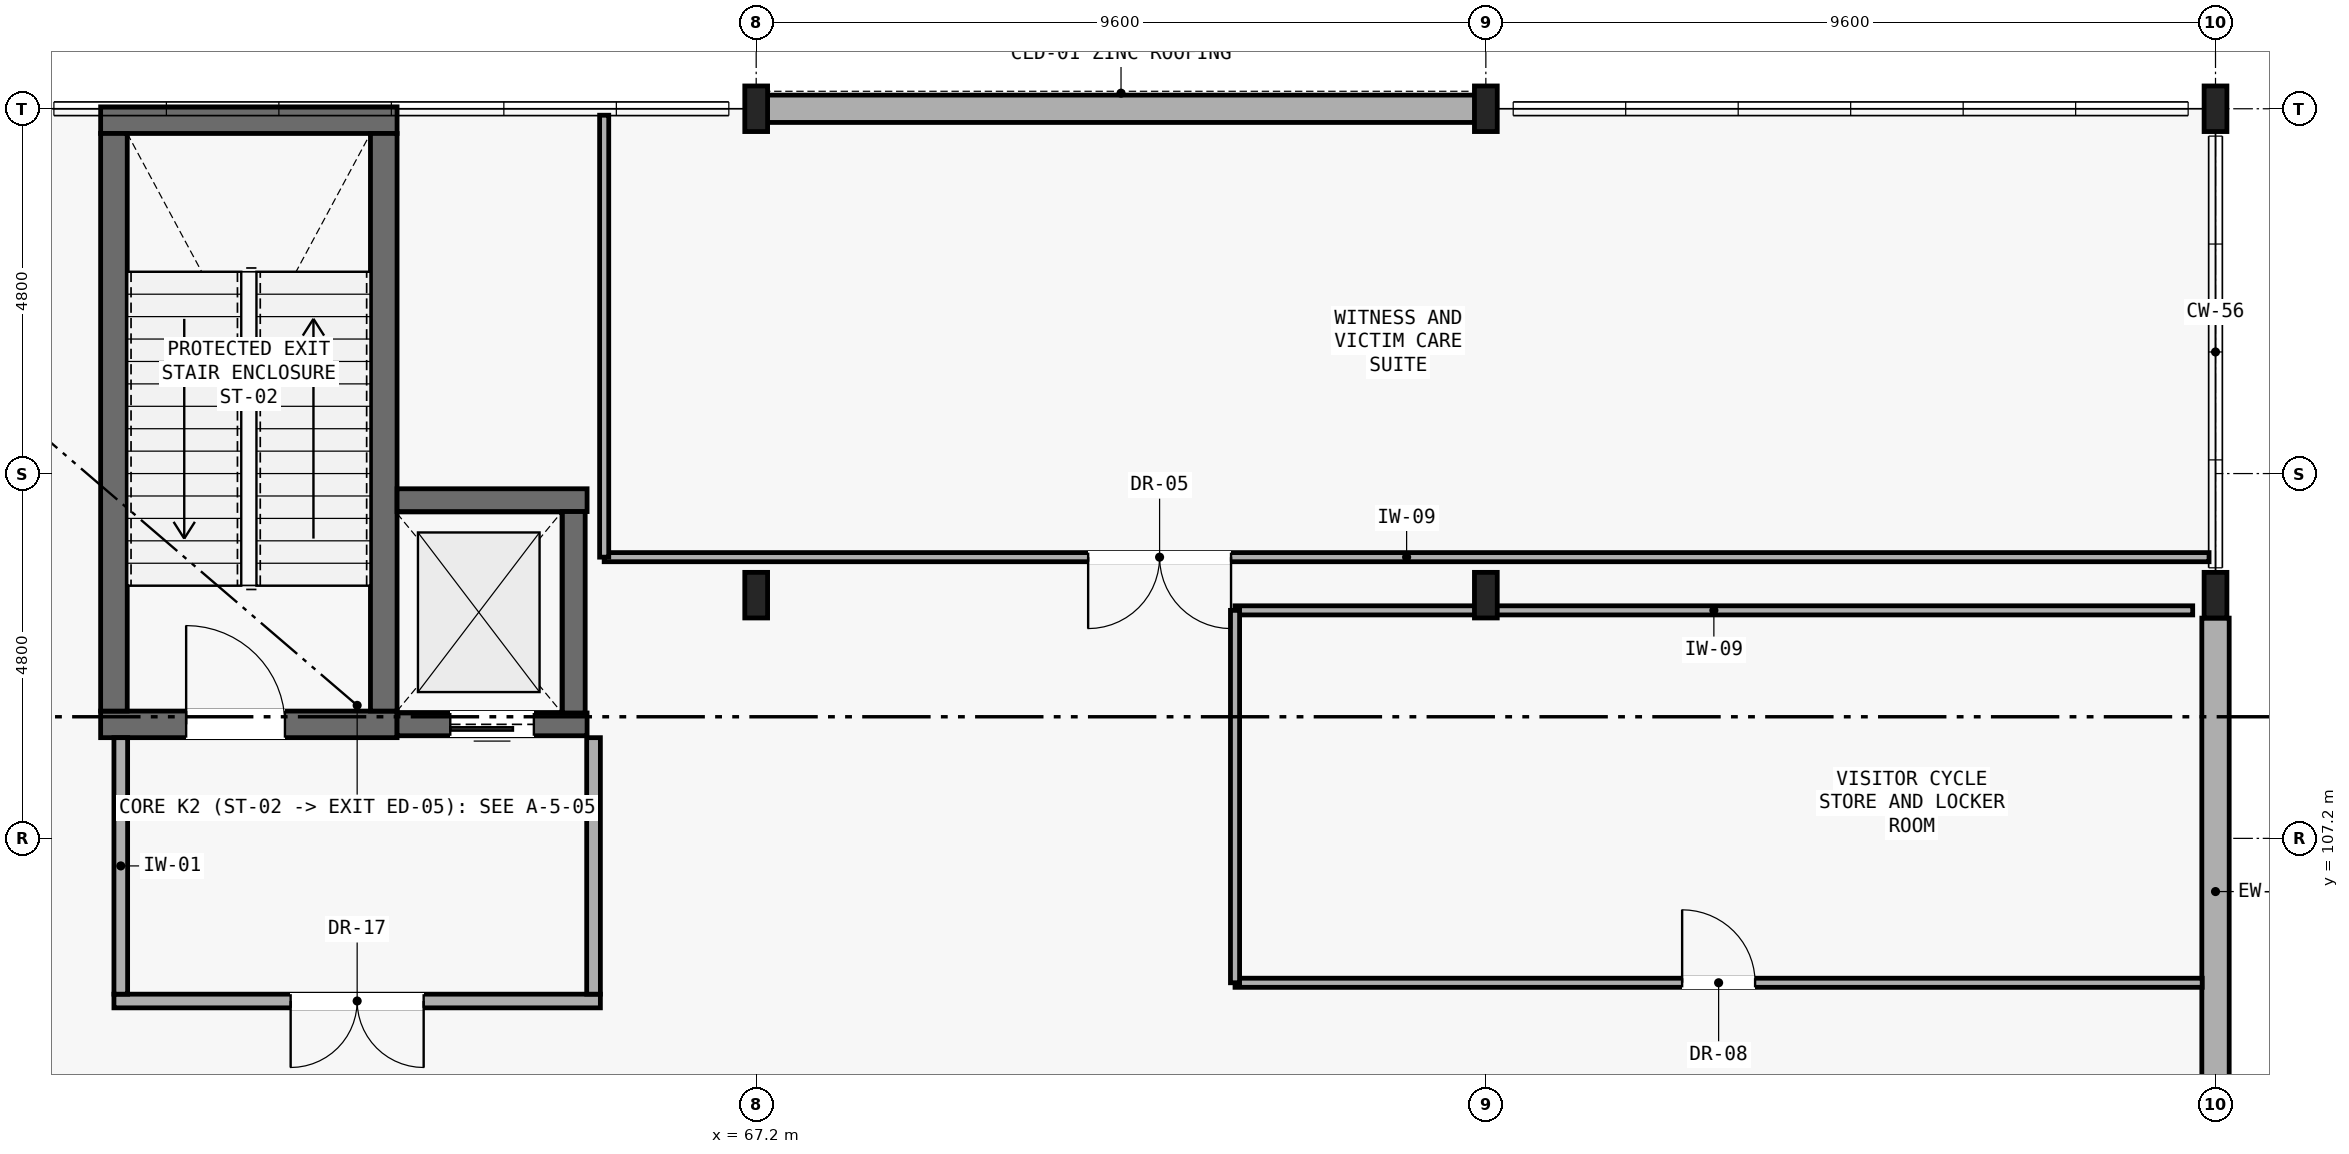
"""IFC4 building model, lengths in metres.
Left out: names, types, materials, properties, quantities, classifications, styles, units other than length and angle.
Written with IfcOpenShell. Run it as: python <this file> out.ifc"""

import sys

from ifc_helpers import new_model, si_unit, direction, frame, frame_2d, origin, origin_2d, place, context, subcontext, project, spatial, rectangle, i_section, extrude, element, fill, save


model = new_model("IFC4")
c1 = context("Model", 3, precision=1e-05, world=origin(), true_north=direction((0.0, 1.0)))
c2 = subcontext(c1, "Body", "Model", "MODEL_VIEW")
j1 = project(units=[si_unit("LENGTHUNIT", "METRE"), si_unit("PLANEANGLEUNIT", "RADIAN")], contexts=[c1])
p1 = place(None, origin())
s1 = spatial("IfcSite", under=j1, at=p1, CompositionType="ELEMENT")
p2 = place(p1, origin())
s2 = spatial("IfcBuilding", under=s1, at=p2, CompositionType="ELEMENT")
p3 = place(p2, origin())
s3 = spatial("IfcBuildingStorey", under=s2, at=p3, CompositionType="ELEMENT", Elevation=0.0)
for number, where, z_axis, x_axis in (
    (1, (67.2, 110.4, 0.0), (0.0, 0.0, 1.0), (1.0, 0.0, 0.0)),
    (2, (67.2, 116.8, 0.0), (0.0, 0.0, 1.0), (1.0, 0.0, 0.0)),
    (3, (76.8, 110.4, 0.0), (0.0, 0.0, 1.0), (1.0, 0.0, 0.0)),
    (4, (76.8, 116.8, 0.0), (0.0, 0.0, 1.0), (1.0, 0.0, 0.0)),
    (5, (86.4, 110.4, 0.0), (0.0, 0.0, 1.0), (1.0, 0.0, 0.0)),
    (6, (86.4, 116.8, 0.0), (0.0, 0.0, 1.0), (1.0, 0.0, 0.0)),
):
    element("IfcColumn", number, at=place(p3, frame(where, z_axis=z_axis, x_axis=x_axis)), inside=s3, PredefinedType="COLUMN", context=c2, shape_type="SweptSolid", body=[
        extrude(i_section(OverallWidth=0.3, OverallDepth=0.6, WebThickness=0.015, FlangeThickness=0.03, FilletRadius=0.027, at=origin_2d()), origin(), (0.0, 0.0, 1.0), 5.25),
    ])
p4 = place(p3, frame((67.21, 116.8, 0.0), z_axis=(0.0, 0.0, 1.0), x_axis=(1.0, 0.0, 0.0)))
e7 = element("IfcWall", 7, at=p4, inside=s3, PredefinedType="SOLIDWALL", context=c2, shape_type="SweptSolid", body=[
    extrude(rectangle(XDim=9.581, YDim=0.36, at=frame_2d((4.79, 0.0))), origin(), (0.0, 0.0, 1.0), 4.67),
])
p5 = place(p3, frame((86.4, 102.902, 0.0), z_axis=(0.0, 0.0, 1.0), x_axis=(0.0, 1.0, 0.0)))
e8 = element("IfcWall", 8, at=p5, inside=s3, PredefinedType="SOLIDWALL", context=c2, shape_type="SweptSolid", body=[
    extrude(rectangle(XDim=7.196, YDim=0.36, at=frame_2d((3.598, 0.0))), origin(), (0.0, 0.0, 1.0), 4.54),
])
p6 = place(p3, frame((58.575, 108.7, 0.0), z_axis=(0.0, 0.0, 1.0), x_axis=(1.0, 0.0, 0.0)))
e9 = element("IfcWall", 9, at=p6, inside=s3, PredefinedType="SHEAR", context=c2, shape_type="SweptSolid", body=[
    extrude(rectangle(XDim=3.9, YDim=0.35, at=frame_2d((1.95, 0.0))), origin(), (0.0, 0.0, 1.0), 5.0),
])
p7 = place(p6, frame((1.125, 0.0, 0.0)))
e10 = element("IfcOpeningElement", 10, at=p7, cuts=e9, PredefinedType="OPENING", context=c2, shape_type="SweptSolid", body=[
    extrude(rectangle(XDim=1.3, YDim=2.15, at=frame_2d((0.65, 1.075))), frame((0.0, 0.185, 0.0), z_axis=(0.0, -1.0, 0.0), x_axis=(1.0, 0.0, 0.0)), (0.0, 0.0, 1.0), 0.37),
])
p8 = place(p3, frame((58.575, 116.65, 0.0), z_axis=(0.0, 0.0, 1.0), x_axis=(1.0, 0.0, 0.0)))
e11 = element("IfcWall", 11, at=p8, inside=s3, PredefinedType="SHEAR", context=c2, shape_type="SweptSolid", body=[
    extrude(rectangle(XDim=3.9, YDim=0.35, at=frame_2d((1.95, 0.0))), origin(), (0.0, 0.0, 1.0), 5.0),
])
for number, where, z_axis, x_axis in (
    (12, (58.75, 108.875, 0.0), (0.0, 0.0, 1.0), (0.0, 1.0, 0.0)),
    (13, (62.3, 108.875, 0.0), (0.0, 0.0, 1.0), (0.0, 1.0, 0.0)),
):
    element("IfcWall", number, at=place(p3, frame(where, z_axis=z_axis, x_axis=x_axis)), inside=s3, PredefinedType="SHEAR", context=c2, shape_type="SweptSolid", body=[
        extrude(rectangle(XDim=7.6, YDim=0.35, at=frame_2d((3.8, 0.0))), origin(), (0.0, 0.0, 1.0), 5.0),
    ])
p9 = place(p3, frame((62.475, 108.7, 0.0), z_axis=(0.0, 0.0, 1.0), x_axis=(1.0, 0.0, 0.0)))
e14 = element("IfcWall", 14, at=p9, inside=s3, PredefinedType="SHEAR", context=c2, shape_type="SweptSolid", body=[
    extrude(rectangle(XDim=2.5, YDim=0.3, at=frame_2d((1.25, 0.0))), origin(), (0.0, 0.0, 1.0), 5.0),
])
p10 = place(p9, frame((0.7, 0.0, 0.0)))
e15 = element("IfcOpeningElement", 15, at=p10, cuts=e14, PredefinedType="OPENING", context=c2, shape_type="SweptSolid", body=[
    extrude(rectangle(XDim=1.1, YDim=2.1, at=frame_2d((0.55, 1.05))), frame((0.0, 0.16, 0.0), z_axis=(0.0, -1.0, 0.0), x_axis=(1.0, 0.0, 0.0)), (0.0, 0.0, 1.0), 0.32),
])
p11 = place(p3, frame((62.475, 111.65, 0.0), z_axis=(0.0, 0.0, 1.0), x_axis=(1.0, 0.0, 0.0)))
e16 = element("IfcWall", 16, at=p11, inside=s3, PredefinedType="SHEAR", context=c2, shape_type="SweptSolid", body=[
    extrude(rectangle(XDim=2.5, YDim=0.3, at=frame_2d((1.25, 0.0))), origin(), (0.0, 0.0, 1.0), 5.0),
])
p12 = place(p3, frame((64.8, 108.85, 0.0), z_axis=(0.0, 0.0, 1.0), x_axis=(0.0, 1.0, 0.0)))
e17 = element("IfcWall", 17, at=p12, inside=s3, PredefinedType="SHEAR", context=c2, shape_type="SweptSolid", body=[
    extrude(rectangle(XDim=2.65, YDim=0.3, at=frame_2d((1.325, 0.0))), origin(), (0.0, 0.0, 1.0), 5.0),
])
p13 = place(p3, frame((58.75, 105.06, 0.0), z_axis=(0.0, 0.0, 1.0), x_axis=(1.0, 0.0, 0.0)))
e18 = element("IfcWall", 18, at=p13, inside=s3, PredefinedType="PARTITIONING", context=c2, shape_type="SweptSolid", body=[
    extrude(rectangle(XDim=6.4, YDim=0.18, at=frame_2d((3.2, 0.0))), origin(), (0.0, 0.0, 1.0), 4.62),
])
p14 = place(p13, frame((2.325, 0.0, 0.0)))
e19 = element("IfcOpeningElement", 19, at=p14, cuts=e18, PredefinedType="OPENING", context=c2, shape_type="SweptSolid", body=[
    extrude(rectangle(XDim=1.75, YDim=2.15, at=frame_2d((0.875, 1.075))), frame((0.0, 0.1, 0.0), z_axis=(0.0, -1.0, 0.0), x_axis=(1.0, 0.0, 0.0)), (0.0, 0.0, 1.0), 0.2),
])
for number, where, z_axis, x_axis in (
    (20, (58.84, 105.15, 0.0), (0.0, 0.0, 1.0), (0.0, 1.0, 0.0)),
    (21, (65.06, 105.15, 0.0), (0.0, 0.0, 1.0), (0.0, 1.0, 0.0)),
):
    element("IfcWall", number, at=place(p3, frame(where, z_axis=z_axis, x_axis=x_axis)), inside=s3, PredefinedType="PARTITIONING", context=c2, shape_type="SweptSolid", body=[
        extrude(rectangle(XDim=3.375, YDim=0.18, at=frame_2d((1.688, 0.0))), origin(), (0.0, 0.0, 1.0), 5.0),
    ])
p15 = place(p3, frame((65.2, 110.9, 0.0), z_axis=(0.0, 0.0, 1.0), x_axis=(1.0, 0.0, 0.0)))
e22 = element("IfcWall", 22, at=p15, inside=s3, PredefinedType="PARTITIONING", context=c2, shape_type="SweptSolid", body=[
    extrude(rectangle(XDim=21.115, YDim=0.12, at=frame_2d((10.558, 0.0))), origin(), (0.0, 0.0, 1.0), 5.0),
])
p16 = place(p15, frame((6.367, 0.0, 0.0)))
e23 = element("IfcOpeningElement", 23, at=p16, cuts=e22, PredefinedType="OPENING", context=c2, shape_type="SweptSolid", body=[
    extrude(rectangle(XDim=1.88, YDim=2.25, at=frame_2d((0.94, 1.125))), frame((0.0, 0.07, 0.0), z_axis=(0.0, -1.0, 0.0), x_axis=(1.0, 0.0, 0.0)), (0.0, 0.0, 1.0), 0.14),
])
p17 = place(p3, frame((65.2, 116.715, 0.0), z_axis=(0.0, 0.0, 1.0), x_axis=(0.0, -1.0, 0.0)))
e24 = element("IfcWall", 24, at=p17, inside=s3, PredefinedType="PARTITIONING", context=c2, shape_type="SweptSolid", body=[
    extrude(rectangle(XDim=5.815, YDim=0.12, at=frame_2d((2.908, 0.0))), origin(), (0.0, 0.0, 1.0), 5.0),
])
p18 = place(p3, frame((73.5, 105.3, 0.0), z_axis=(0.0, 0.0, 1.0), x_axis=(1.0, 0.0, 0.0)))
e25 = element("IfcWall", 25, at=p18, inside=s3, PredefinedType="PARTITIONING", context=c2, shape_type="SweptSolid", body=[
    extrude(rectangle(XDim=12.725, YDim=0.12, at=frame_2d((6.363, 0.0))), origin(), (0.0, 0.0, 1.0), 4.62),
])
p19 = place(p18, frame((5.883, 0.0, 0.0)))
e26 = element("IfcOpeningElement", 26, at=p19, cuts=e25, PredefinedType="OPENING", context=c2, shape_type="SweptSolid", body=[
    extrude(rectangle(XDim=0.96, YDim=2.08, at=frame_2d((0.48, 1.04))), frame((0.0, 0.07, 0.0), z_axis=(0.0, -1.0, 0.0), x_axis=(1.0, 0.0, 0.0)), (0.0, 0.0, 1.0), 0.14),
])
p20 = place(p3, frame((86.1, 110.2, 0.0), z_axis=(0.0, 0.0, 1.0), x_axis=(-1.0, 0.0, 0.0)))
e27 = element("IfcWall", 27, at=p20, inside=s3, PredefinedType="PARTITIONING", context=c2, shape_type="SweptSolid", body=[
    extrude(rectangle(XDim=12.6, YDim=0.12, at=frame_2d((6.3, 0.0))), origin(), (0.0, 0.0, 1.0), 4.44),
])
p21 = place(p3, frame((73.5, 110.2, 0.0), z_axis=(0.0, 0.0, 1.0), x_axis=(0.0, -1.0, 0.0)))
e28 = element("IfcWall", 28, at=p21, inside=s3, PredefinedType="PARTITIONING", context=c2, shape_type="SweptSolid", body=[
    extrude(rectangle(XDim=4.9, YDim=0.12, at=frame_2d((2.45, 0.0))), origin(), (0.0, 0.0, 1.0), 5.0),
])
p22 = place(p7, origin())
e29 = element("IfcDoor", 29, at=p22, inside=s3, OperationType="SINGLE_SWING_LEFT", PredefinedType="DOOR", context=c2, shape_type="SweptSolid", body=[
    extrude(rectangle(XDim=1.3, YDim=2.15, at=frame_2d((0.65, 1.075))), frame((0.0, 0.025, 0.0), z_axis=(0.0, -1.0, 0.0), x_axis=(1.0, 0.0, 0.0)), (0.0, 0.0, 1.0), 0.05),
])
fill(e10, e29)
p23 = place(p10, frame((1.1, 0.0, 0.0), z_axis=(0.0, 0.0, 1.0), x_axis=(-1.0, 0.0, 0.0)))
e30 = element("IfcDoor", 30, at=p23, inside=s3, OperationType="SLIDING_TO_LEFT", PredefinedType="DOOR", context=c2, shape_type="SweptSolid", body=[
    extrude(rectangle(XDim=1.1, YDim=2.1, at=frame_2d((0.55, 1.05))), frame((0.0, 0.025, 0.0), z_axis=(0.0, -1.0, 0.0), x_axis=(1.0, 0.0, 0.0)), (0.0, 0.0, 1.0), 0.05),
])
fill(e15, e30)
p24 = place(p14, frame((1.75, 0.0, 0.0), z_axis=(0.0, 0.0, 1.0), x_axis=(-1.0, 0.0, 0.0)))
e31 = element("IfcDoor", 31, at=p24, inside=s3, OperationType="DOUBLE_DOOR_SINGLE_SWING", PredefinedType="DOOR", context=c2, shape_type="SweptSolid", body=[
    extrude(rectangle(XDim=1.75, YDim=2.15, at=frame_2d((0.875, 1.075))), frame((0.0, 0.025, 0.0), z_axis=(0.0, -1.0, 0.0), x_axis=(1.0, 0.0, 0.0)), (0.0, 0.0, 1.0), 0.05),
])
fill(e19, e31)
p25 = place(p16, frame((1.88, 0.0, 0.0), z_axis=(0.0, 0.0, 1.0), x_axis=(-1.0, 0.0, 0.0)))
e32 = element("IfcDoor", 32, at=p25, inside=s3, OperationType="DOUBLE_DOOR_SINGLE_SWING", PredefinedType="DOOR", context=c2, shape_type="SweptSolid", body=[
    extrude(rectangle(XDim=1.88, YDim=2.25, at=frame_2d((0.94, 1.125))), frame((0.0, 0.025, 0.0), z_axis=(0.0, -1.0, 0.0), x_axis=(1.0, 0.0, 0.0)), (0.0, 0.0, 1.0), 0.05),
])
fill(e23, e32)
p26 = place(p19, origin())
e33 = element("IfcDoor", 33, at=p26, inside=s3, OperationType="SINGLE_SWING_LEFT", PredefinedType="DOOR", context=c2, shape_type="SweptSolid", body=[
    extrude(rectangle(XDim=0.96, YDim=2.08, at=frame_2d((0.48, 1.04))), frame((0.0, 0.025, 0.0), z_axis=(0.0, -1.0, 0.0), x_axis=(1.0, 0.0, 0.0)), (0.0, 0.0, 1.0), 0.05),
])
fill(e26, e33)
save(model, sys.argv[1])
